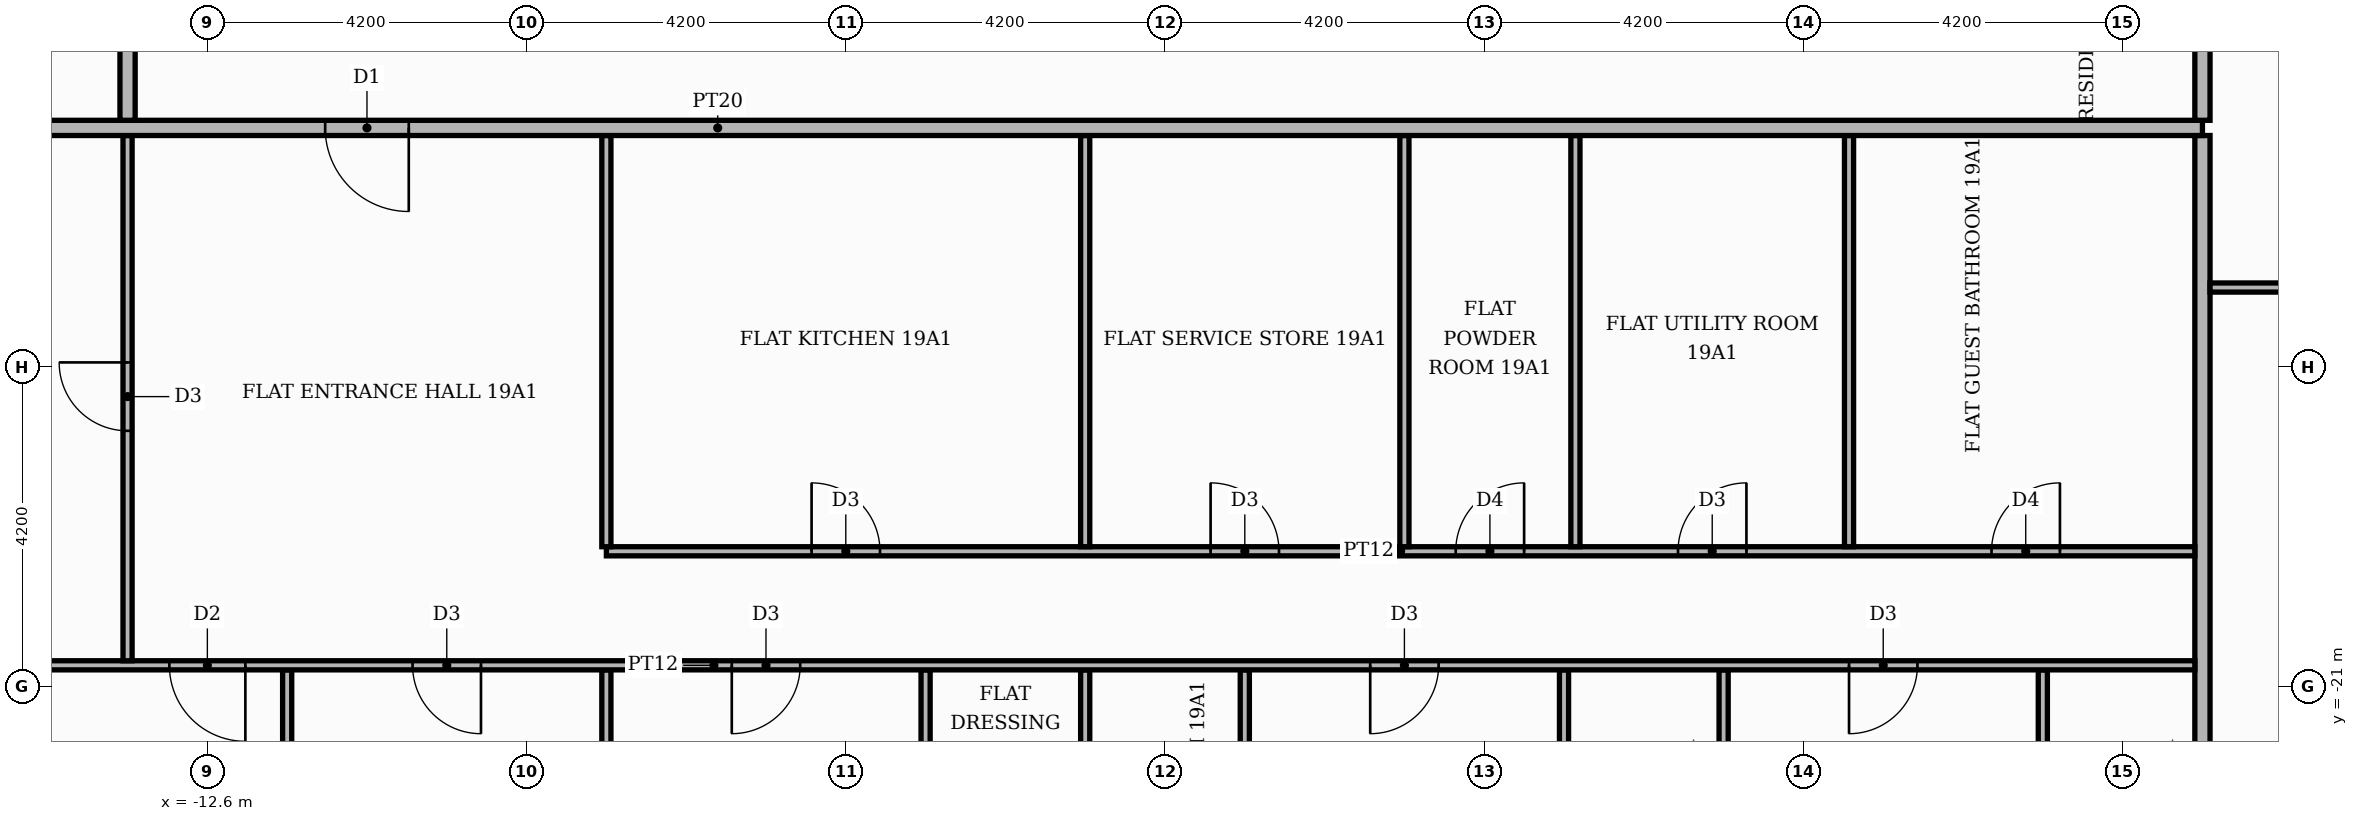
"""IFC4 building model, lengths in metres.
Left out: names, types, materials, properties, quantities, classifications, styles, units other than length and angle.
Written with IfcOpenShell. Run it as: python <this file> out.ifc"""

import sys

from ifc_helpers import new_model, si_unit, direction, frame, frame_2d, origin, place, context, subcontext, project, spatial, rectangle, extrude, element, fill, save


model = new_model("IFC4")
c1 = context("Model", 3, precision=1e-05, world=origin(), true_north=direction((0.0, 1.0)))
c2 = subcontext(c1, "Body", "Model", "MODEL_VIEW")
j1 = project(units=[si_unit("LENGTHUNIT", "METRE"), si_unit("PLANEANGLEUNIT", "RADIAN")], contexts=[c1])
p1 = place(None, origin())
s1 = spatial("IfcSite", under=j1, at=p1, CompositionType="ELEMENT")
p2 = place(p1, origin())
s2 = spatial("IfcBuilding", under=s1, at=p2, CompositionType="ELEMENT")
p3 = place(p2, frame((0.0, 0.0, 83.1)))
s3 = spatial("IfcBuildingStorey", under=s2, at=p3, CompositionType="ELEMENT", Elevation=83.1)
for number, where, z_axis, x_axis in (
    (1, (-11.55, -25.42, 0.0), (0.0, 0.0, 1.0), (0.0, 1.0, 0.0)),
    (2, (-7.35, -25.42, 0.0), (0.0, 0.0, 1.0), (0.0, 1.0, 0.0)),
):
    element("IfcWall", number, at=place(p3, frame(where, z_axis=z_axis, x_axis=x_axis)), inside=s3, PredefinedType="PARTITIONING", context=c2, shape_type="SweptSolid", body=[
        extrude(rectangle(XDim=4.64, YDim=0.12, at=frame_2d((2.32, 0.0))), origin(), (0.0, 0.0, 1.0), 3.48),
    ])
p4 = place(p3, frame((-3.15, -25.42, 0.0), z_axis=(0.0, 0.0, 1.0), x_axis=(0.0, 1.0, 0.0)))
e3 = element("IfcWall", 3, at=p4, inside=s3, PredefinedType="PARTITIONING", context=c2, shape_type="SweptSolid", body=[
    extrude(rectangle(XDim=4.64, YDim=0.12, at=frame_2d((2.32, 0.0))), origin(), (0.0, 0.0, 1.0), 3.48),
])
p5 = place(p4, frame((1.75, 0.0, 0.0)))
e4 = element("IfcOpeningElement", 4, at=p5, cuts=e3, PredefinedType="OPENING", context=c2, shape_type="SweptSolid", body=[
    extrude(rectangle(XDim=0.9, YDim=2.1, at=frame_2d((0.45, 1.05))), frame((0.0, 0.07, 0.0), z_axis=(0.0, -1.0, 0.0), x_axis=(1.0, 0.0, 0.0)), (0.0, 0.0, 1.0), 0.14),
])
p6 = place(p3, frame((-1.05, -25.42, 0.0), z_axis=(0.0, 0.0, 1.0), x_axis=(0.0, 1.0, 0.0)))
e5 = element("IfcWall", 5, at=p6, inside=s3, PredefinedType="PARTITIONING", context=c2, shape_type="SweptSolid", body=[
    extrude(rectangle(XDim=4.64, YDim=0.12, at=frame_2d((2.32, 0.0))), origin(), (0.0, 0.0, 1.0), 3.48),
])
p7 = place(p6, frame((1.75, 0.0, 0.0)))
e6 = element("IfcOpeningElement", 6, at=p7, cuts=e5, PredefinedType="OPENING", context=c2, shape_type="SweptSolid", body=[
    extrude(rectangle(XDim=0.9, YDim=2.1, at=frame_2d((0.45, 1.05))), frame((0.0, 0.07, 0.0), z_axis=(0.0, -1.0, 0.0), x_axis=(1.0, 0.0, 0.0)), (0.0, 0.0, 1.0), 0.14),
])
p8 = place(p3, frame((1.05, -25.42, 0.0), z_axis=(0.0, 0.0, 1.0), x_axis=(0.0, 1.0, 0.0)))
e7 = element("IfcWall", 7, at=p8, inside=s3, PredefinedType="PARTITIONING", context=c2, shape_type="SweptSolid", body=[
    extrude(rectangle(XDim=4.64, YDim=0.12, at=frame_2d((2.32, 0.0))), origin(), (0.0, 0.0, 1.0), 3.48),
])
p9 = place(p3, frame((5.25, -25.42, 0.0), z_axis=(0.0, 0.0, 1.0), x_axis=(0.0, 1.0, 0.0)))
e8 = element("IfcWall", 8, at=p9, inside=s3, PredefinedType="PARTITIONING", context=c2, shape_type="SweptSolid", body=[
    extrude(rectangle(XDim=4.64, YDim=0.12, at=frame_2d((2.32, 0.0))), origin(), (0.0, 0.0, 1.0), 3.48),
])
p10 = place(p9, frame((1.75, 0.0, 0.0)))
e9 = element("IfcOpeningElement", 9, at=p10, cuts=e8, PredefinedType="OPENING", context=c2, shape_type="SweptSolid", body=[
    extrude(rectangle(XDim=0.9, YDim=2.1, at=frame_2d((0.45, 1.05))), frame((0.0, 0.07, 0.0), z_axis=(0.0, -1.0, 0.0), x_axis=(1.0, 0.0, 0.0)), (0.0, 0.0, 1.0), 0.14),
])
p11 = place(p3, frame((7.35, -25.42, 0.0), z_axis=(0.0, 0.0, 1.0), x_axis=(0.0, 1.0, 0.0)))
e10 = element("IfcWall", 10, at=p11, inside=s3, PredefinedType="PARTITIONING", context=c2, shape_type="SweptSolid", body=[
    extrude(rectangle(XDim=4.64, YDim=0.12, at=frame_2d((2.32, 0.0))), origin(), (0.0, 0.0, 1.0), 3.48),
])
p12 = place(p3, frame((11.55, -25.42, 0.0), z_axis=(0.0, 0.0, 1.0), x_axis=(0.0, 1.0, 0.0)))
e11 = element("IfcWall", 11, at=p12, inside=s3, PredefinedType="PARTITIONING", context=c2, shape_type="SweptSolid", body=[
    extrude(rectangle(XDim=4.64, YDim=0.12, at=frame_2d((2.32, 0.0))), origin(), (0.0, 0.0, 1.0), 3.48),
])
p13 = place(p12, frame((1.75, 0.0, 0.0)))
e12 = element("IfcOpeningElement", 12, at=p13, cuts=e11, PredefinedType="OPENING", context=c2, shape_type="SweptSolid", body=[
    extrude(rectangle(XDim=0.9, YDim=2.1, at=frame_2d((0.45, 1.05))), frame((0.0, 0.07, 0.0), z_axis=(0.0, -1.0, 0.0), x_axis=(1.0, 0.0, 0.0)), (0.0, 0.0, 1.0), 0.14),
])
p14 = place(p3, frame((13.65, -25.42, 0.0), z_axis=(0.0, 0.0, 1.0), x_axis=(0.0, 1.0, 0.0)))
e13 = element("IfcWall", 13, at=p14, inside=s3, PredefinedType="PARTITIONING", context=c2, shape_type="SweptSolid", body=[
    extrude(rectangle(XDim=11.67, YDim=0.2, at=frame_2d((5.835, 0.0))), origin(), (0.0, 0.0, 1.0), 3.48),
])
p15 = place(p3, frame((-25.42, -20.72, 0.0), z_axis=(0.0, 0.0, 1.0), x_axis=(1.0, 0.0, 0.0)))
e14 = element("IfcWall", 14, at=p15, inside=s3, PredefinedType="PARTITIONING", context=c2, shape_type="SweptSolid", body=[
    extrude(rectangle(XDim=38.97, YDim=0.12, at=frame_2d((19.485, 0.0))), origin(), (0.0, 0.0, 1.0), 3.48),
])
p16 = place(p15, frame((12.32, 0.0, 0.0)))
e15 = element("IfcOpeningElement", 15, at=p16, cuts=e14, PredefinedType="OPENING", context=c2, shape_type="SweptSolid", body=[
    extrude(rectangle(XDim=1.0, YDim=2.1, at=frame_2d((0.5, 1.05))), frame((0.0, 0.07, 0.0), z_axis=(0.0, -1.0, 0.0), x_axis=(1.0, 0.0, 0.0)), (0.0, 0.0, 1.0), 0.14),
])
p17 = place(p15, frame((15.52, 0.0, 0.0)))
e16 = element("IfcOpeningElement", 16, at=p17, cuts=e14, PredefinedType="OPENING", context=c2, shape_type="SweptSolid", body=[
    extrude(rectangle(XDim=0.9, YDim=2.1, at=frame_2d((0.45, 1.05))), frame((0.0, 0.07, 0.0), z_axis=(0.0, -1.0, 0.0), x_axis=(1.0, 0.0, 0.0)), (0.0, 0.0, 1.0), 0.14),
])
p18 = place(p15, frame((19.72, 0.0, 0.0)))
e17 = element("IfcOpeningElement", 17, at=p18, cuts=e14, PredefinedType="OPENING", context=c2, shape_type="SweptSolid", body=[
    extrude(rectangle(XDim=0.9, YDim=2.1, at=frame_2d((0.45, 1.05))), frame((0.0, 0.07, 0.0), z_axis=(0.0, -1.0, 0.0), x_axis=(1.0, 0.0, 0.0)), (0.0, 0.0, 1.0), 0.14),
])
p19 = place(p15, frame((28.12, 0.0, 0.0)))
e18 = element("IfcOpeningElement", 18, at=p19, cuts=e14, PredefinedType="OPENING", context=c2, shape_type="SweptSolid", body=[
    extrude(rectangle(XDim=0.9, YDim=2.1, at=frame_2d((0.45, 1.05))), frame((0.0, 0.07, 0.0), z_axis=(0.0, -1.0, 0.0), x_axis=(1.0, 0.0, 0.0)), (0.0, 0.0, 1.0), 0.14),
])
p20 = place(p15, frame((34.42, 0.0, 0.0)))
e19 = element("IfcOpeningElement", 19, at=p20, cuts=e14, PredefinedType="OPENING", context=c2, shape_type="SweptSolid", body=[
    extrude(rectangle(XDim=0.9, YDim=2.1, at=frame_2d((0.45, 1.05))), frame((0.0, 0.07, 0.0), z_axis=(0.0, -1.0, 0.0), x_axis=(1.0, 0.0, 0.0)), (0.0, 0.0, 1.0), 0.14),
])
p21 = place(p3, frame((-13.65, -20.66, 0.0), z_axis=(0.0, 0.0, 1.0), x_axis=(0.0, 1.0, 0.0)))
e20 = element("IfcWall", 20, at=p21, inside=s3, PredefinedType="PARTITIONING", context=c2, shape_type="SweptSolid", body=[
    extrude(rectangle(XDim=6.91, YDim=0.12, at=frame_2d((3.455, 0.0))), origin(), (0.0, 0.0, 1.0), 3.48),
])
p22 = place(p21, frame((3.025, 0.0, 0.0)))
e21 = element("IfcOpeningElement", 21, at=p22, cuts=e20, PredefinedType="OPENING", context=c2, shape_type="SweptSolid", body=[
    extrude(rectangle(XDim=0.9, YDim=2.1, at=frame_2d((0.45, 1.05))), frame((0.0, 0.07, 0.0), z_axis=(0.0, -1.0, 0.0), x_axis=(1.0, 0.0, 0.0)), (0.0, 0.0, 1.0), 0.14),
])
p23 = place(p3, frame((-7.35, -19.22, 0.0), z_axis=(0.0, 0.0, 1.0), x_axis=(1.0, 0.0, 0.0)))
e22 = element("IfcWall", 22, at=p23, inside=s3, PredefinedType="PARTITIONING", context=c2, shape_type="SweptSolid", body=[
    extrude(rectangle(XDim=20.9, YDim=0.12, at=frame_2d((10.45, 0.0))), origin(), (0.0, 0.0, 1.0), 3.48),
])
p24 = place(p23, frame((2.7, 0.0, 0.0)))
e23 = element("IfcOpeningElement", 23, at=p24, cuts=e22, PredefinedType="OPENING", context=c2, shape_type="SweptSolid", body=[
    extrude(rectangle(XDim=0.9, YDim=2.1, at=frame_2d((0.45, 1.05))), frame((0.0, 0.07, 0.0), z_axis=(0.0, -1.0, 0.0), x_axis=(1.0, 0.0, 0.0)), (0.0, 0.0, 1.0), 0.14),
])
p25 = place(p23, frame((7.95, 0.0, 0.0)))
e24 = element("IfcOpeningElement", 24, at=p25, cuts=e22, PredefinedType="OPENING", context=c2, shape_type="SweptSolid", body=[
    extrude(rectangle(XDim=0.9, YDim=2.1, at=frame_2d((0.45, 1.05))), frame((0.0, 0.07, 0.0), z_axis=(0.0, -1.0, 0.0), x_axis=(1.0, 0.0, 0.0)), (0.0, 0.0, 1.0), 0.14),
])
p26 = place(p23, frame((11.175, 0.0, 0.0)))
e25 = element("IfcOpeningElement", 25, at=p26, cuts=e22, PredefinedType="OPENING", context=c2, shape_type="SweptSolid", body=[
    extrude(rectangle(XDim=0.9, YDim=2.1, at=frame_2d((0.45, 1.05))), frame((0.0, 0.07, 0.0), z_axis=(0.0, -1.0, 0.0), x_axis=(1.0, 0.0, 0.0)), (0.0, 0.0, 1.0), 0.14),
])
p27 = place(p23, frame((14.1, 0.0, 0.0)))
e26 = element("IfcOpeningElement", 26, at=p27, cuts=e22, PredefinedType="OPENING", context=c2, shape_type="SweptSolid", body=[
    extrude(rectangle(XDim=0.9, YDim=2.1, at=frame_2d((0.45, 1.05))), frame((0.0, 0.07, 0.0), z_axis=(0.0, -1.0, 0.0), x_axis=(1.0, 0.0, 0.0)), (0.0, 0.0, 1.0), 0.14),
])
p28 = place(p23, frame((18.225, 0.0, 0.0)))
e27 = element("IfcOpeningElement", 27, at=p28, cuts=e22, PredefinedType="OPENING", context=c2, shape_type="SweptSolid", body=[
    extrude(rectangle(XDim=0.9, YDim=2.1, at=frame_2d((0.45, 1.05))), frame((0.0, 0.07, 0.0), z_axis=(0.0, -1.0, 0.0), x_axis=(1.0, 0.0, 0.0)), (0.0, 0.0, 1.0), 0.14),
])
for number, where, z_axis, x_axis in (
    (28, (-7.35, -19.16, 0.0), (0.0, 0.0, 1.0), (0.0, 1.0, 0.0)),
    (29, (-1.05, -19.16, 0.0), (0.0, 0.0, 1.0), (0.0, 1.0, 0.0)),
    (30, (3.15, -19.16, 0.0), (0.0, 0.0, 1.0), (0.0, 1.0, 0.0)),
    (31, (5.4, -19.16, 0.0), (0.0, 0.0, 1.0), (0.0, 1.0, 0.0)),
    (32, (9.0, -19.16, 0.0), (0.0, 0.0, 1.0), (0.0, 1.0, 0.0)),
):
    element("IfcWall", number, at=place(p3, frame(where, z_axis=z_axis, x_axis=x_axis)), inside=s3, PredefinedType="PARTITIONING", context=c2, shape_type="SweptSolid", body=[
        extrude(rectangle(XDim=5.41, YDim=0.12, at=frame_2d((2.705, 0.0))), origin(), (0.0, 0.0, 1.0), 3.48),
    ])
p29 = place(p3, frame((13.75, -15.75, 0.0), z_axis=(0.0, 0.0, 1.0), x_axis=(1.0, 0.0, 0.0)))
e33 = element("IfcWall", 33, at=p29, inside=s3, PredefinedType="PARTITIONING", context=c2, shape_type="SweptSolid", body=[
    extrude(rectangle(XDim=6.37, YDim=0.12, at=frame_2d((3.185, 0.0))), origin(), (0.0, 0.0, 1.0), 3.48),
])
p30 = place(p29, frame((2.635, 0.0, 0.0)))
e34 = element("IfcOpeningElement", 34, at=p30, cuts=e33, PredefinedType="OPENING", context=c2, shape_type="SweptSolid", body=[
    extrude(rectangle(XDim=1.0, YDim=2.1, at=frame_2d((0.5, 1.05))), frame((0.0, 0.07, 0.0), z_axis=(0.0, -1.0, 0.0), x_axis=(1.0, 0.0, 0.0)), (0.0, 0.0, 1.0), 0.14),
])
p31 = place(p3, frame((-25.42, -13.65, 0.0), z_axis=(0.0, 0.0, 1.0), x_axis=(1.0, 0.0, 0.0)))
e35 = element("IfcWall", 35, at=p31, inside=s3, PredefinedType="PARTITIONING", context=c2, shape_type="SweptSolid", body=[
    extrude(rectangle(XDim=39.07, YDim=0.2, at=frame_2d((19.535, 0.0))), origin(), (0.0, 0.0, 1.0), 3.48),
])
p32 = place(p31, frame((14.37, 0.0, 0.0)))
e36 = element("IfcOpeningElement", 36, at=p32, cuts=e35, PredefinedType="OPENING", context=c2, shape_type="SweptSolid", body=[
    extrude(rectangle(XDim=1.1, YDim=2.4, at=frame_2d((0.55, 1.2))), frame((0.0, 0.11, 0.0), z_axis=(0.0, -1.0, 0.0), x_axis=(1.0, 0.0, 0.0)), (0.0, 0.0, 1.0), 0.22),
])
p33 = place(p3, frame((-13.65, -13.55, 0.0), z_axis=(0.0, 0.0, 1.0), x_axis=(0.0, 1.0, 0.0)))
e37 = element("IfcWall", 37, at=p33, inside=s3, PredefinedType="PARTITIONING", context=c2, shape_type="SweptSolid", body=[
    extrude(rectangle(XDim=18.7, YDim=0.2, at=frame_2d((9.35, 0.0))), origin(), (0.0, 0.0, 1.0), 3.48),
])
p34 = place(p33, frame((14.05, 0.0, 0.0)))
e38 = element("IfcOpeningElement", 38, at=p34, cuts=e37, PredefinedType="OPENING", context=c2, shape_type="SweptSolid", body=[
    extrude(rectangle(XDim=1.1, YDim=2.4, at=frame_2d((0.55, 1.2))), frame((0.0, 0.11, 0.0), z_axis=(0.0, -1.0, 0.0), x_axis=(1.0, 0.0, 0.0)), (0.0, 0.0, 1.0), 0.22),
])
p35 = place(p3, frame((13.65, -13.55, 0.0), z_axis=(0.0, 0.0, 1.0), x_axis=(0.0, 1.0, 0.0)))
e39 = element("IfcWall", 39, at=p35, inside=s3, PredefinedType="PARTITIONING", context=c2, shape_type="SweptSolid", body=[
    extrude(rectangle(XDim=8.2, YDim=0.2, at=frame_2d((4.1, 0.0))), origin(), (0.0, 0.0, 1.0), 3.48),
])
p36 = place(p35, frame((1.45, 0.0, 0.0)))
e40 = element("IfcOpeningElement", 40, at=p36, cuts=e39, PredefinedType="OPENING", context=c2, shape_type="SweptSolid", body=[
    extrude(rectangle(XDim=1.1, YDim=2.4, at=frame_2d((0.55, 1.2))), frame((0.0, 0.11, 0.0), z_axis=(0.0, -1.0, 0.0), x_axis=(1.0, 0.0, 0.0)), (0.0, 0.0, 1.0), 0.22),
])
p37 = place(p32, frame((1.1, 0.0, 0.0), z_axis=(0.0, 0.0, 1.0), x_axis=(-1.0, 0.0, 0.0)))
e41 = element("IfcDoor", 41, at=p37, inside=s3, OperationType="SINGLE_SWING_RIGHT", PredefinedType="DOOR", context=c2, shape_type="SweptSolid", body=[
    extrude(rectangle(XDim=1.1, YDim=2.4, at=frame_2d((0.55, 1.2))), frame((0.0, 0.025, 0.0), z_axis=(0.0, -1.0, 0.0), x_axis=(1.0, 0.0, 0.0)), (0.0, 0.0, 1.0), 0.05),
])
fill(e36, e41)
p38 = place(p22, origin())
e42 = element("IfcDoor", 42, at=p38, inside=s3, OperationType="SINGLE_SWING_RIGHT", PredefinedType="DOOR", context=c2, shape_type="SweptSolid", body=[
    extrude(rectangle(XDim=0.9, YDim=2.1, at=frame_2d((0.45, 1.05))), frame((0.0, 0.025, 0.0), z_axis=(0.0, -1.0, 0.0), x_axis=(1.0, 0.0, 0.0)), (0.0, 0.0, 1.0), 0.05),
])
fill(e21, e42)
p39 = place(p24, origin())
e43 = element("IfcDoor", 43, at=p39, inside=s3, OperationType="SINGLE_SWING_LEFT", PredefinedType="DOOR", context=c2, shape_type="SweptSolid", body=[
    extrude(rectangle(XDim=0.9, YDim=2.1, at=frame_2d((0.45, 1.05))), frame((0.0, 0.025, 0.0), z_axis=(0.0, -1.0, 0.0), x_axis=(1.0, 0.0, 0.0)), (0.0, 0.0, 1.0), 0.05),
])
fill(e23, e43)
p40 = place(p25, origin())
e44 = element("IfcDoor", 44, at=p40, inside=s3, OperationType="SINGLE_SWING_LEFT", PredefinedType="DOOR", context=c2, shape_type="SweptSolid", body=[
    extrude(rectangle(XDim=0.9, YDim=2.1, at=frame_2d((0.45, 1.05))), frame((0.0, 0.025, 0.0), z_axis=(0.0, -1.0, 0.0), x_axis=(1.0, 0.0, 0.0)), (0.0, 0.0, 1.0), 0.05),
])
fill(e24, e44)
p41 = place(p26, origin())
e45 = element("IfcDoor", 45, at=p41, inside=s3, OperationType="SINGLE_SWING_RIGHT", PredefinedType="DOOR", context=c2, shape_type="SweptSolid", body=[
    extrude(rectangle(XDim=0.9, YDim=2.1, at=frame_2d((0.45, 1.05))), frame((0.0, 0.025, 0.0), z_axis=(0.0, -1.0, 0.0), x_axis=(1.0, 0.0, 0.0)), (0.0, 0.0, 1.0), 0.05),
])
fill(e25, e45)
p42 = place(p27, origin())
e46 = element("IfcDoor", 46, at=p42, inside=s3, OperationType="SINGLE_SWING_RIGHT", PredefinedType="DOOR", context=c2, shape_type="SweptSolid", body=[
    extrude(rectangle(XDim=0.9, YDim=2.1, at=frame_2d((0.45, 1.05))), frame((0.0, 0.025, 0.0), z_axis=(0.0, -1.0, 0.0), x_axis=(1.0, 0.0, 0.0)), (0.0, 0.0, 1.0), 0.05),
])
fill(e26, e46)
p43 = place(p28, origin())
e47 = element("IfcDoor", 47, at=p43, inside=s3, OperationType="SINGLE_SWING_RIGHT", PredefinedType="DOOR", context=c2, shape_type="SweptSolid", body=[
    extrude(rectangle(XDim=0.9, YDim=2.1, at=frame_2d((0.45, 1.05))), frame((0.0, 0.025, 0.0), z_axis=(0.0, -1.0, 0.0), x_axis=(1.0, 0.0, 0.0)), (0.0, 0.0, 1.0), 0.05),
])
fill(e27, e47)
p44 = place(p16, frame((1.0, 0.0, 0.0), z_axis=(0.0, 0.0, 1.0), x_axis=(-1.0, 0.0, 0.0)))
e48 = element("IfcDoor", 48, at=p44, inside=s3, OperationType="SINGLE_SWING_RIGHT", PredefinedType="DOOR", context=c2, shape_type="SweptSolid", body=[
    extrude(rectangle(XDim=1.0, YDim=2.1, at=frame_2d((0.5, 1.05))), frame((0.0, 0.025, 0.0), z_axis=(0.0, -1.0, 0.0), x_axis=(1.0, 0.0, 0.0)), (0.0, 0.0, 1.0), 0.05),
])
fill(e15, e48)
p45 = place(p17, frame((0.9, 0.0, 0.0), z_axis=(0.0, 0.0, 1.0), x_axis=(-1.0, 0.0, 0.0)))
e49 = element("IfcDoor", 49, at=p45, inside=s3, OperationType="SINGLE_SWING_RIGHT", PredefinedType="DOOR", context=c2, shape_type="SweptSolid", body=[
    extrude(rectangle(XDim=0.9, YDim=2.1, at=frame_2d((0.45, 1.05))), frame((0.0, 0.025, 0.0), z_axis=(0.0, -1.0, 0.0), x_axis=(1.0, 0.0, 0.0)), (0.0, 0.0, 1.0), 0.05),
])
fill(e16, e49)
p46 = place(p18, frame((0.9, 0.0, 0.0), z_axis=(0.0, 0.0, 1.0), x_axis=(-1.0, 0.0, 0.0)))
e50 = element("IfcDoor", 50, at=p46, inside=s3, OperationType="SINGLE_SWING_LEFT", PredefinedType="DOOR", context=c2, shape_type="SweptSolid", body=[
    extrude(rectangle(XDim=0.9, YDim=2.1, at=frame_2d((0.45, 1.05))), frame((0.0, 0.025, 0.0), z_axis=(0.0, -1.0, 0.0), x_axis=(1.0, 0.0, 0.0)), (0.0, 0.0, 1.0), 0.05),
])
fill(e17, e50)
p47 = place(p19, frame((0.9, 0.0, 0.0), z_axis=(0.0, 0.0, 1.0), x_axis=(-1.0, 0.0, 0.0)))
e51 = element("IfcDoor", 51, at=p47, inside=s3, OperationType="SINGLE_SWING_LEFT", PredefinedType="DOOR", context=c2, shape_type="SweptSolid", body=[
    extrude(rectangle(XDim=0.9, YDim=2.1, at=frame_2d((0.45, 1.05))), frame((0.0, 0.025, 0.0), z_axis=(0.0, -1.0, 0.0), x_axis=(1.0, 0.0, 0.0)), (0.0, 0.0, 1.0), 0.05),
])
fill(e18, e51)
p48 = place(p20, frame((0.9, 0.0, 0.0), z_axis=(0.0, 0.0, 1.0), x_axis=(-1.0, 0.0, 0.0)))
e52 = element("IfcDoor", 52, at=p48, inside=s3, OperationType="SINGLE_SWING_LEFT", PredefinedType="DOOR", context=c2, shape_type="SweptSolid", body=[
    extrude(rectangle(XDim=0.9, YDim=2.1, at=frame_2d((0.45, 1.05))), frame((0.0, 0.025, 0.0), z_axis=(0.0, -1.0, 0.0), x_axis=(1.0, 0.0, 0.0)), (0.0, 0.0, 1.0), 0.05),
])
fill(e19, e52)
save(model, sys.argv[1])
